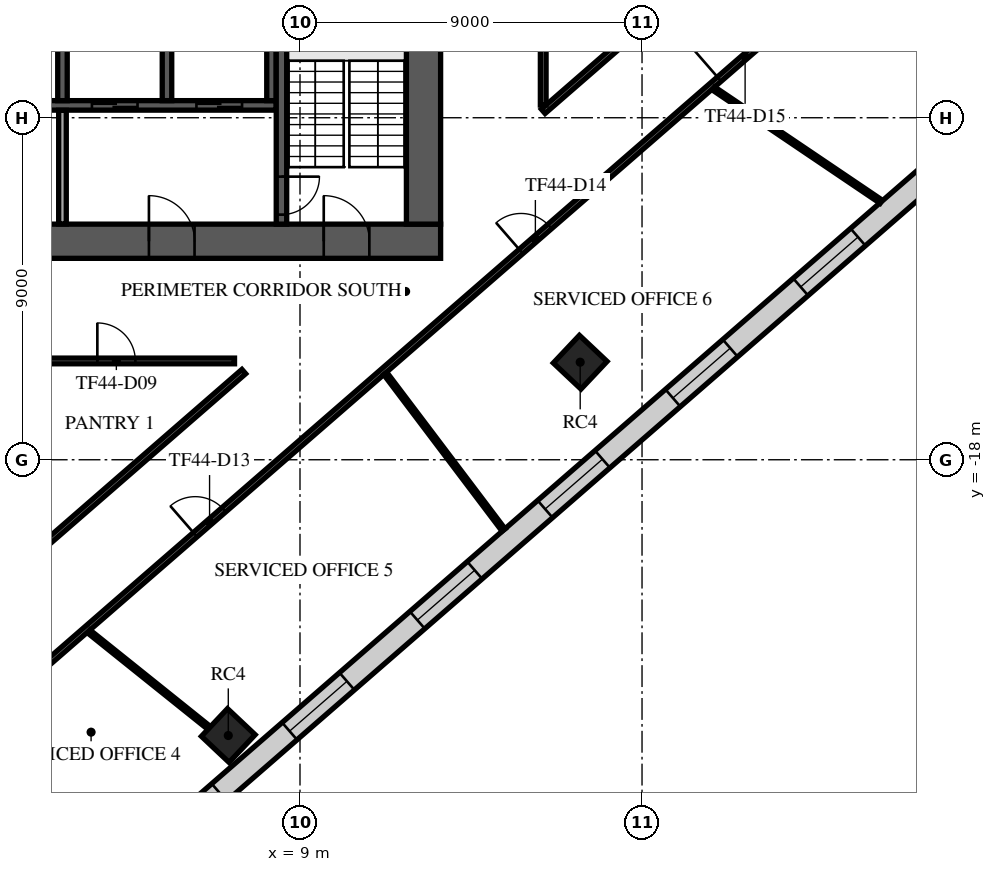
"""IFC4 building model, lengths in metres.
Left out: names, types, materials, properties, quantities, classifications, styles, units other than length and angle.
Written with IfcOpenShell. Run it as: python <this file> out.ifc"""

import sys

from ifc_helpers import new_model, si_unit, direction, frame, frame_2d, origin, origin_2d, place, context, subcontext, project, spatial, rectangle, extrude, element, fill, save


model = new_model("IFC4")
c1 = context("Model", 3, precision=1e-05, world=origin(), true_north=direction((0.0, 1.0)))
c2 = subcontext(c1, "Body", "Model", "MODEL_VIEW")
j1 = project(units=[si_unit("LENGTHUNIT", "METRE"), si_unit("PLANEANGLEUNIT", "RADIAN")], contexts=[c1])
p1 = place(None, origin())
s1 = spatial("IfcSite", under=j1, at=p1, CompositionType="ELEMENT")
p2 = place(p1, origin())
s2 = spatial("IfcBuilding", under=s1, at=p2, CompositionType="ELEMENT")
p3 = place(p2, frame((0.0, 0.0, 193.3)))
s3 = spatial("IfcBuildingStorey", under=s2, at=p3, CompositionType="ELEMENT", Elevation=193.3)
for number, where, z_axis, x_axis in (
    (1, (7.113, -25.257, 0.0), (0.0, 0.0, 1.0), (0.686, 0.728, 0.0)),
    (2, (16.373, -15.433, 0.0), (0.0, 0.0, 1.0), (0.686, 0.728, 0.0)),
):
    element("IfcColumn", number, at=place(p3, frame(where, z_axis=z_axis, x_axis=x_axis)), inside=s3, PredefinedType="COLUMN", context=c2, shape_type="SweptSolid", body=[
        extrude(rectangle(XDim=1.0, YDim=1.0, at=origin_2d()), origin(), (0.0, 0.0, 1.0), 4.0),
    ])
p4 = place(p3, frame((-12.7, -12.25, 0.0), z_axis=(0.0, 0.0, 1.0), x_axis=(1.0, 0.0, 0.0)))
e3 = element("IfcWall", 3, at=p4, inside=s3, PredefinedType="SHEAR", context=c2, shape_type="SweptSolid", body=[
    extrude(rectangle(XDim=25.4, YDim=0.9, at=frame_2d((12.7, 0.0))), origin(), (0.0, 0.0, 1.0), 3.62),
])
p5 = place(p4, frame((7.6, 0.0, 0.0)))
e4 = element("IfcOpeningElement", 4, at=p5, cuts=e3, PredefinedType="OPENING", context=c2, shape_type="SweptSolid", body=[
    extrude(rectangle(XDim=2.0, YDim=2.1, at=frame_2d((1.0, 1.05))), frame((0.0, 0.46, 0.0), z_axis=(0.0, -1.0, 0.0), x_axis=(1.0, 0.0, 0.0)), (0.0, 0.0, 1.0), 0.92),
])
p6 = place(p4, frame((17.725, 0.0, 0.0)))
e5 = element("IfcOpeningElement", 5, at=p6, cuts=e3, PredefinedType="OPENING", context=c2, shape_type="SweptSolid", body=[
    extrude(rectangle(XDim=1.2, YDim=2.1, at=frame_2d((0.6, 1.05))), frame((0.0, 0.46, 0.0), z_axis=(0.0, -1.0, 0.0), x_axis=(1.0, 0.0, 0.0)), (0.0, 0.0, 1.0), 0.92),
])
p7 = place(p4, frame((1.875, 0.0, 0.0)))
e6 = element("IfcOpeningElement", 6, at=p7, cuts=e3, PredefinedType="OPENING", context=c2, shape_type="SweptSolid", body=[
    extrude(rectangle(XDim=1.2, YDim=2.1, at=frame_2d((0.6, 1.05))), frame((0.0, 0.46, 0.0), z_axis=(0.0, -1.0, 0.0), x_axis=(1.0, 0.0, 0.0)), (0.0, 0.0, 1.0), 0.92),
])
p8 = place(p4, frame((22.325, 0.0, 0.0)))
e7 = element("IfcOpeningElement", 7, at=p8, cuts=e3, PredefinedType="OPENING", context=c2, shape_type="SweptSolid", body=[
    extrude(rectangle(XDim=1.2, YDim=2.1, at=frame_2d((0.6, 1.05))), frame((0.0, 0.46, 0.0), z_axis=(0.0, -1.0, 0.0), x_axis=(1.0, 0.0, 0.0)), (0.0, 0.0, 1.0), 0.92),
])
p9 = place(p3, frame((12.25, -11.8, 0.0), z_axis=(0.0, 0.0, 1.0), x_axis=(0.0, 1.0, 0.0)))
e8 = element("IfcWall", 8, at=p9, inside=s3, PredefinedType="SHEAR", context=c2, shape_type="SweptSolid", body=[
    extrude(rectangle(XDim=23.6, YDim=0.9, at=frame_2d((11.8, 0.0))), origin(), (0.0, 0.0, 1.0), 3.62),
])
p10 = place(p9, frame((10.6, 0.0, 0.0)))
e9 = element("IfcOpeningElement", 9, at=p10, cuts=e8, PredefinedType="OPENING", context=c2, shape_type="SweptSolid", body=[
    extrude(rectangle(XDim=2.4, YDim=2.4, at=frame_2d((1.2, 1.2))), frame((0.0, 0.46, 0.0), z_axis=(0.0, -1.0, 0.0), x_axis=(1.0, 0.0, 0.0)), (0.0, 0.0, 1.0), 0.92),
])
p11 = place(p3, frame((-2.875, -8.675, 0.0), z_axis=(0.0, 0.0, 1.0), x_axis=(1.0, 0.0, 0.0)))
e10 = element("IfcWall", 10, at=p11, inside=s3, PredefinedType="SOLIDWALL", context=c2, shape_type="SweptSolid", body=[
    extrude(rectangle(XDim=11.25, YDim=0.25, at=frame_2d((5.625, 0.0))), origin(), (0.0, 0.0, 1.0), 3.62),
])
p12 = place(p11, frame((0.9, 0.0, 0.0)))
e11 = element("IfcOpeningElement", 11, at=p12, cuts=e10, PredefinedType="OPENING", context=c2, shape_type="SweptSolid", body=[
    extrude(rectangle(XDim=1.2, YDim=2.1, at=frame_2d((0.6, 1.05))), frame((0.0, 0.135, 0.0), z_axis=(0.0, -1.0, 0.0), x_axis=(1.0, 0.0, 0.0)), (0.0, 0.0, 1.0), 0.27),
])
p13 = place(p11, frame((3.65, 0.0, 0.0)))
e12 = element("IfcOpeningElement", 12, at=p13, cuts=e10, PredefinedType="OPENING", context=c2, shape_type="SweptSolid", body=[
    extrude(rectangle(XDim=1.2, YDim=2.1, at=frame_2d((0.6, 1.05))), frame((0.0, 0.135, 0.0), z_axis=(0.0, -1.0, 0.0), x_axis=(1.0, 0.0, 0.0)), (0.0, 0.0, 1.0), 0.27),
])
p14 = place(p11, frame((6.4, 0.0, 0.0)))
e13 = element("IfcOpeningElement", 13, at=p14, cuts=e10, PredefinedType="OPENING", context=c2, shape_type="SweptSolid", body=[
    extrude(rectangle(XDim=1.2, YDim=2.1, at=frame_2d((0.6, 1.05))), frame((0.0, 0.135, 0.0), z_axis=(0.0, -1.0, 0.0), x_axis=(1.0, 0.0, 0.0)), (0.0, 0.0, 1.0), 0.27),
])
p15 = place(p11, frame((9.15, 0.0, 0.0)))
e14 = element("IfcOpeningElement", 14, at=p15, cuts=e10, PredefinedType="OPENING", context=c2, shape_type="SweptSolid", body=[
    extrude(rectangle(XDim=1.2, YDim=2.1, at=frame_2d((0.6, 1.05))), frame((0.0, 0.135, 0.0), z_axis=(0.0, -1.0, 0.0), x_axis=(1.0, 0.0, 0.0)), (0.0, 0.0, 1.0), 0.27),
])
for number, where, z_axis, x_axis in (
    (15, (2.75, -8.55, 0.0), (0.0, 0.0, 1.0), (0.0, 1.0, 0.0)),
    (16, (5.5, -8.55, 0.0), (0.0, 0.0, 1.0), (0.0, 1.0, 0.0)),
    (17, (8.25, -8.55, 0.0), (0.0, 0.0, 1.0), (0.0, 1.0, 0.0)),
):
    element("IfcWall", number, at=place(p3, frame(where, z_axis=z_axis, x_axis=x_axis)), inside=s3, PredefinedType="SOLIDWALL", context=c2, shape_type="SweptSolid", body=[
        extrude(rectangle(XDim=2.7, YDim=0.25, at=frame_2d((1.35, 0.0))), origin(), (0.0, 0.0, 1.0), 3.62),
    ])
p16 = place(p3, frame((8.512, -4.55, 0.0), z_axis=(0.0, 0.0, 1.0), x_axis=(0.0, -1.0, 0.0)))
e18 = element("IfcWall", 18, at=p16, inside=s3, PredefinedType="SOLIDWALL", context=c2, shape_type="SweptSolid", body=[
    extrude(rectangle(XDim=7.25, YDim=0.275, at=frame_2d((3.625, 0.0))), origin(), (0.0, 0.0, 1.0), 3.62),
])
p17 = place(p16, frame((6.0, 0.0, 0.0)))
e19 = element("IfcOpeningElement", 19, at=p17, cuts=e18, PredefinedType="OPENING", context=c2, shape_type="SweptSolid", body=[
    extrude(rectangle(XDim=1.0, YDim=2.1, at=frame_2d((0.5, 1.05))), frame((0.0, 0.147, 0.0), z_axis=(0.0, -1.0, 0.0), x_axis=(1.0, 0.0, 0.0)), (0.0, 0.0, 1.0), 0.295),
])
p18 = place(p3, frame((2.75, -11.795, 0.0), z_axis=(0.0, 0.0, 1.0), x_axis=(0.0, 1.0, 0.0)))
e20 = element("IfcWall", 20, at=p18, inside=s3, PredefinedType="PARTITIONING", context=c2, shape_type="SweptSolid", body=[
    extrude(rectangle(XDim=2.99, YDim=0.2, at=frame_2d((1.495, 0.0))), origin(), (0.0, 0.0, 1.0), 3.62),
])
p19 = place(p3, frame((-2.286, -34.715, 0.0), z_axis=(0.0, 0.0, 1.0), x_axis=(0.754708272811, 0.656060532993, 0.0)))
e21 = element("IfcWall", 21, at=p19, inside=s3, PredefinedType="STANDARD", context=c2, shape_type="SweptSolid", body=[
    extrude(rectangle(XDim=49.0, YDim=0.6, at=frame_2d((24.5, 0.0))), origin(), (0.0, 0.0, 1.0), 3.62),
])
p20 = place(p19, frame((1.227, 0.0, 0.9)))
e22 = element("IfcOpeningElement", 22, at=p20, cuts=e21, PredefinedType="OPENING", context=c2, shape_type="SweptSolid", body=[
    extrude(rectangle(XDim=2.0, YDim=2.1, at=frame_2d((1.0, 1.05))), frame((0.0, 0.31, 0.0), z_axis=(0.0, -1.0, 0.0), x_axis=(1.0, 0.0, 0.0)), (0.0, 0.0, 1.0), 0.62),
])
p21 = place(p19, frame((5.682, 0.0, 0.9)))
e23 = element("IfcOpeningElement", 23, at=p21, cuts=e21, PredefinedType="OPENING", context=c2, shape_type="SweptSolid", body=[
    extrude(rectangle(XDim=2.0, YDim=2.1, at=frame_2d((1.0, 1.05))), frame((0.0, 0.31, 0.0), z_axis=(0.0, -1.0, 0.0), x_axis=(1.0, 0.0, 0.0)), (0.0, 0.0, 1.0), 0.62),
])
p22 = place(p19, frame((10.136, 0.0, 0.9)))
e24 = element("IfcOpeningElement", 24, at=p22, cuts=e21, PredefinedType="OPENING", context=c2, shape_type="SweptSolid", body=[
    extrude(rectangle(XDim=2.0, YDim=2.1, at=frame_2d((1.0, 1.05))), frame((0.0, 0.31, 0.0), z_axis=(0.0, -1.0, 0.0), x_axis=(1.0, 0.0, 0.0)), (0.0, 0.0, 1.0), 0.62),
])
p23 = place(p19, frame((14.591, 0.0, 0.9)))
e25 = element("IfcOpeningElement", 25, at=p23, cuts=e21, PredefinedType="OPENING", context=c2, shape_type="SweptSolid", body=[
    extrude(rectangle(XDim=2.0, YDim=2.1, at=frame_2d((1.0, 1.05))), frame((0.0, 0.31, 0.0), z_axis=(0.0, -1.0, 0.0), x_axis=(1.0, 0.0, 0.0)), (0.0, 0.0, 1.0), 0.62),
])
p24 = place(p19, frame((19.045, 0.0, 0.9)))
e26 = element("IfcOpeningElement", 26, at=p24, cuts=e21, PredefinedType="OPENING", context=c2, shape_type="SweptSolid", body=[
    extrude(rectangle(XDim=2.0, YDim=2.1, at=frame_2d((1.0, 1.05))), frame((0.0, 0.31, 0.0), z_axis=(0.0, -1.0, 0.0), x_axis=(1.0, 0.0, 0.0)), (0.0, 0.0, 1.0), 0.62),
])
p25 = place(p19, frame((23.5, 0.0, 0.9)))
e27 = element("IfcOpeningElement", 27, at=p25, cuts=e21, PredefinedType="OPENING", context=c2, shape_type="SweptSolid", body=[
    extrude(rectangle(XDim=2.0, YDim=2.1, at=frame_2d((1.0, 1.05))), frame((0.0, 0.31, 0.0), z_axis=(0.0, -1.0, 0.0), x_axis=(1.0, 0.0, 0.0)), (0.0, 0.0, 1.0), 0.62),
])
p26 = place(p19, frame((27.955, 0.0, 0.9)))
e28 = element("IfcOpeningElement", 28, at=p26, cuts=e21, PredefinedType="OPENING", context=c2, shape_type="SweptSolid", body=[
    extrude(rectangle(XDim=2.0, YDim=2.1, at=frame_2d((1.0, 1.05))), frame((0.0, 0.31, 0.0), z_axis=(0.0, -1.0, 0.0), x_axis=(1.0, 0.0, 0.0)), (0.0, 0.0, 1.0), 0.62),
])
p27 = place(p19, frame((32.409, 0.0, 0.9)))
e29 = element("IfcOpeningElement", 29, at=p27, cuts=e21, PredefinedType="OPENING", context=c2, shape_type="SweptSolid", body=[
    extrude(rectangle(XDim=2.0, YDim=2.1, at=frame_2d((1.0, 1.05))), frame((0.0, 0.31, 0.0), z_axis=(0.0, -1.0, 0.0), x_axis=(1.0, 0.0, 0.0)), (0.0, 0.0, 1.0), 0.62),
])
p28 = place(p19, frame((36.864, 0.0, 0.9)))
e30 = element("IfcOpeningElement", 30, at=p28, cuts=e21, PredefinedType="OPENING", context=c2, shape_type="SweptSolid", body=[
    extrude(rectangle(XDim=2.0, YDim=2.1, at=frame_2d((1.0, 1.05))), frame((0.0, 0.31, 0.0), z_axis=(0.0, -1.0, 0.0), x_axis=(1.0, 0.0, 0.0)), (0.0, 0.0, 1.0), 0.62),
])
p29 = place(p19, frame((41.318, 0.0, 0.9)))
e31 = element("IfcOpeningElement", 31, at=p29, cuts=e21, PredefinedType="OPENING", context=c2, shape_type="SweptSolid", body=[
    extrude(rectangle(XDim=2.0, YDim=2.1, at=frame_2d((1.0, 1.05))), frame((0.0, 0.31, 0.0), z_axis=(0.0, -1.0, 0.0), x_axis=(1.0, 0.0, 0.0)), (0.0, 0.0, 1.0), 0.62),
])
p30 = place(p19, frame((45.773, 0.0, 0.9)))
e32 = element("IfcOpeningElement", 32, at=p30, cuts=e21, PredefinedType="OPENING", context=c2, shape_type="SweptSolid", body=[
    extrude(rectangle(XDim=2.0, YDim=2.1, at=frame_2d((1.0, 1.05))), frame((0.0, 0.31, 0.0), z_axis=(0.0, -1.0, 0.0), x_axis=(1.0, 0.0, 0.0)), (0.0, 0.0, 1.0), 0.62),
])
p31 = place(p3, frame((-10.486, -15.4, 0.0), z_axis=(0.0, 0.0, 1.0), x_axis=(1.0, 0.0, 0.0)))
e33 = element("IfcWall", 33, at=p31, inside=s3, PredefinedType="PARTITIONING", context=c2, shape_type="SweptSolid", body=[
    extrude(rectangle(XDim=17.763, YDim=0.15, at=frame_2d((8.882, 0.0))), origin(), (0.0, 0.0, 1.0), 3.17),
])
p32 = place(p31, frame((14.154, 0.0, 0.0)))
e34 = element("IfcOpeningElement", 34, at=p32, cuts=e33, PredefinedType="OPENING", context=c2, shape_type="SweptSolid", body=[
    extrude(rectangle(XDim=1.0, YDim=2.1, at=frame_2d((0.5, 1.05))), frame((0.0, 0.085, 0.0), z_axis=(0.0, -1.0, 0.0), x_axis=(1.0, 0.0, 0.0)), (0.0, 0.0, 1.0), 0.17),
])
p33 = place(p3, frame((-2.631, -24.505, 0.0), z_axis=(0.0, 0.0, 1.0), x_axis=(0.754714526528, 0.656053338874, 0.0)))
e35 = element("IfcWall", 35, at=p33, inside=s3, PredefinedType="PARTITIONING", context=c2, shape_type="SweptSolid", body=[
    extrude(rectangle(XDim=13.452, YDim=0.15, at=frame_2d((6.726, 0.0))), origin(), (0.0, 0.0, 1.0), 3.17),
])
p34 = place(p33, frame((3.05, 0.0, 0.0)))
e36 = element("IfcOpeningElement", 36, at=p34, cuts=e35, PredefinedType="OPENING", context=c2, shape_type="SweptSolid", body=[
    extrude(rectangle(XDim=1.0, YDim=2.1, at=frame_2d((0.5, 1.05))), frame((0.0, 0.085, 0.0), z_axis=(0.0, -1.0, 0.0), x_axis=(1.0, 0.0, 0.0)), (0.0, 0.0, 1.0), 0.17),
])
p35 = place(p3, frame((-1.0, -26.268, 0.0), z_axis=(0.0, 0.0, 1.0), x_axis=(0.754711356604, 0.656056985492, 0.0)))
e37 = element("IfcWall", 37, at=p35, inside=s3, PredefinedType="PARTITIONING", context=c2, shape_type="SweptSolid", body=[
    extrude(rectangle(XDim=36.052, YDim=0.15, at=frame_2d((18.026, 0.0))), origin(), (0.0, 0.0, 1.0), 3.17),
])
p36 = place(p35, frame((9.598, 0.0, 0.0)))
e38 = element("IfcOpeningElement", 38, at=p36, cuts=e37, PredefinedType="OPENING", context=c2, shape_type="SweptSolid", body=[
    extrude(rectangle(XDim=1.0, YDim=2.1, at=frame_2d((0.5, 1.05))), frame((0.0, 0.085, 0.0), z_axis=(0.0, -1.0, 0.0), x_axis=(1.0, 0.0, 0.0)), (0.0, 0.0, 1.0), 0.17),
])
p37 = place(p35, frame((20.957, 0.0, 0.0)))
e39 = element("IfcOpeningElement", 39, at=p37, cuts=e37, PredefinedType="OPENING", context=c2, shape_type="SweptSolid", body=[
    extrude(rectangle(XDim=1.0, YDim=2.1, at=frame_2d((0.5, 1.05))), frame((0.0, 0.085, 0.0), z_axis=(0.0, -1.0, 0.0), x_axis=(1.0, 0.0, 0.0)), (0.0, 0.0, 1.0), 0.17),
])
p38 = place(p35, frame((27.87, 0.0, 0.0)))
e40 = element("IfcOpeningElement", 40, at=p38, cuts=e37, PredefinedType="OPENING", context=c2, shape_type="SweptSolid", body=[
    extrude(rectangle(XDim=1.8, YDim=2.1, at=frame_2d((0.9, 1.05))), frame((0.0, 0.085, 0.0), z_axis=(0.0, -1.0, 0.0), x_axis=(1.0, 0.0, 0.0)), (0.0, 0.0, 1.0), 0.17),
])
p39 = place(p3, frame((15.4, -8.831, 0.0), z_axis=(0.0, 0.0, 1.0), x_axis=(0.754715065445, 0.656052718911, 0.0)))
e41 = element("IfcWall", 41, at=p39, inside=s3, PredefinedType="PARTITIONING", context=c2, shape_type="SweptSolid", body=[
    extrude(rectangle(XDim=12.234, YDim=0.15, at=frame_2d((6.117, 0.0))), origin(), (0.0, 0.0, 1.0), 3.17),
])
p40 = place(p39, frame((8.8, 0.0, 0.0)))
e42 = element("IfcOpeningElement", 42, at=p40, cuts=e41, PredefinedType="OPENING", context=c2, shape_type="SweptSolid", body=[
    extrude(rectangle(XDim=1.0, YDim=2.1, at=frame_2d((0.5, 1.05))), frame((0.0, 0.085, 0.0), z_axis=(0.0, -1.0, 0.0), x_axis=(1.0, 0.0, 0.0)), (0.0, 0.0, 1.0), 0.17),
])
p41 = place(p3, frame((15.4, -8.667, 0.0), z_axis=(0.0, 0.0, 1.0), x_axis=(0.0, 1.0, 0.0)))
e43 = element("IfcWall", 43, at=p41, inside=s3, PredefinedType="PARTITIONING", context=c2, shape_type="SweptSolid", body=[
    extrude(rectangle(XDim=15.944, YDim=0.15, at=frame_2d((7.972, 0.0))), origin(), (0.0, 0.0, 1.0), 3.17),
])
p42 = place(p3, frame((3.441, -22.517, 0.0), z_axis=(0.0, 0.0, 1.0), x_axis=(0.780129784841, -0.62561770979, 0.0)))
e44 = element("IfcWall", 44, at=p42, inside=s3, PredefinedType="PARTITIONING", context=c2, shape_type="SweptSolid", body=[
    extrude(rectangle(XDim=4.064, YDim=0.1, at=frame_2d((2.032, 0.0))), origin(), (0.0, 0.0, 1.0), 3.17),
])
p43 = place(p3, frame((11.243, -15.729, 0.0), z_axis=(0.0, 0.0, 1.0), x_axis=(0.602848474471, -0.797855699251, 0.0)))
e45 = element("IfcWall", 45, at=p43, inside=s3, PredefinedType="PARTITIONING", context=c2, shape_type="SweptSolid", body=[
    extrude(rectangle(XDim=5.163, YDim=0.1, at=frame_2d((2.582, 0.0))), origin(), (0.0, 0.0, 1.0), 3.17),
])
p44 = place(p3, frame((19.882, -8.231, 0.0), z_axis=(0.0, 0.0, 1.0), x_axis=(0.828654525471, -0.559760374997, 0.0)))
e46 = element("IfcWall", 46, at=p44, inside=s3, PredefinedType="PARTITIONING", context=c2, shape_type="SweptSolid", body=[
    extrude(rectangle(XDim=5.322, YDim=0.1, at=frame_2d((2.661, 0.0))), origin(), (0.0, 0.0, 1.0), 3.62),
])
p45 = place(p6, origin())
e47 = element("IfcDoor", 47, at=p45, inside=s3, OperationType="SINGLE_SWING_LEFT", PredefinedType="DOOR", context=c2, shape_type="SweptSolid", body=[
    extrude(rectangle(XDim=1.2, YDim=2.1, at=frame_2d((0.6, 1.05))), frame((0.0, 0.025, 0.0), z_axis=(0.0, -1.0, 0.0), x_axis=(1.0, 0.0, 0.0)), (0.0, 0.0, 1.0), 0.05),
])
fill(e5, e47)
p46 = place(p8, origin())
e48 = element("IfcDoor", 48, at=p46, inside=s3, OperationType="SINGLE_SWING_LEFT", PredefinedType="DOOR", context=c2, shape_type="SweptSolid", body=[
    extrude(rectangle(XDim=1.2, YDim=2.1, at=frame_2d((0.6, 1.05))), frame((0.0, 0.025, 0.0), z_axis=(0.0, -1.0, 0.0), x_axis=(1.0, 0.0, 0.0)), (0.0, 0.0, 1.0), 0.05),
])
fill(e7, e48)
p47 = place(p14, origin())
e49 = element("IfcDoor", 49, at=p47, inside=s3, OperationType="DOUBLE_DOOR_SLIDING", PredefinedType="DOOR", context=c2, shape_type="SweptSolid", body=[
    extrude(rectangle(XDim=1.2, YDim=2.1, at=frame_2d((0.6, 1.05))), frame((0.0, 0.025, 0.0), z_axis=(0.0, -1.0, 0.0), x_axis=(1.0, 0.0, 0.0)), (0.0, 0.0, 1.0), 0.05),
])
fill(e13, e49)
p48 = place(p15, origin())
e50 = element("IfcDoor", 50, at=p48, inside=s3, OperationType="DOUBLE_DOOR_SLIDING", PredefinedType="DOOR", context=c2, shape_type="SweptSolid", body=[
    extrude(rectangle(XDim=1.2, YDim=2.1, at=frame_2d((0.6, 1.05))), frame((0.0, 0.025, 0.0), z_axis=(0.0, -1.0, 0.0), x_axis=(1.0, 0.0, 0.0)), (0.0, 0.0, 1.0), 0.05),
])
fill(e14, e50)
p49 = place(p17, origin())
e51 = element("IfcDoor", 51, at=p49, inside=s3, OperationType="SINGLE_SWING_LEFT", PredefinedType="DOOR", context=c2, shape_type="SweptSolid", body=[
    extrude(rectangle(XDim=1.0, YDim=2.1, at=frame_2d((0.5, 1.05))), frame((0.0, 0.025, 0.0), z_axis=(0.0, -1.0, 0.0), x_axis=(1.0, 0.0, 0.0)), (0.0, 0.0, 1.0), 0.05),
])
fill(e19, e51)
p50 = place(p22, origin())
e52 = element("IfcWindow", 52, at=p50, inside=s3, PartitioningType="SINGLE_PANEL", PredefinedType="WINDOW", context=c2, shape_type="SweptSolid", body=[
    extrude(rectangle(XDim=2.0, YDim=2.1, at=frame_2d((1.0, 1.05))), frame((0.0, 0.03, 0.0), z_axis=(0.0, -1.0, 0.0), x_axis=(1.0, 0.0, 0.0)), (0.0, 0.0, 1.0), 0.06),
])
fill(e24, e52)
p51 = place(p23, origin())
e53 = element("IfcWindow", 53, at=p51, inside=s3, PartitioningType="SINGLE_PANEL", PredefinedType="WINDOW", context=c2, shape_type="SweptSolid", body=[
    extrude(rectangle(XDim=2.0, YDim=2.1, at=frame_2d((1.0, 1.05))), frame((0.0, 0.03, 0.0), z_axis=(0.0, -1.0, 0.0), x_axis=(1.0, 0.0, 0.0)), (0.0, 0.0, 1.0), 0.06),
])
fill(e25, e53)
p52 = place(p24, origin())
e54 = element("IfcWindow", 54, at=p52, inside=s3, PartitioningType="SINGLE_PANEL", PredefinedType="WINDOW", context=c2, shape_type="SweptSolid", body=[
    extrude(rectangle(XDim=2.0, YDim=2.1, at=frame_2d((1.0, 1.05))), frame((0.0, 0.03, 0.0), z_axis=(0.0, -1.0, 0.0), x_axis=(1.0, 0.0, 0.0)), (0.0, 0.0, 1.0), 0.06),
])
fill(e26, e54)
p53 = place(p25, origin())
e55 = element("IfcWindow", 55, at=p53, inside=s3, PartitioningType="SINGLE_PANEL", PredefinedType="WINDOW", context=c2, shape_type="SweptSolid", body=[
    extrude(rectangle(XDim=2.0, YDim=2.1, at=frame_2d((1.0, 1.05))), frame((0.0, 0.03, 0.0), z_axis=(0.0, -1.0, 0.0), x_axis=(1.0, 0.0, 0.0)), (0.0, 0.0, 1.0), 0.06),
])
fill(e27, e55)
p54 = place(p26, origin())
e56 = element("IfcWindow", 56, at=p54, inside=s3, PartitioningType="SINGLE_PANEL", PredefinedType="WINDOW", context=c2, shape_type="SweptSolid", body=[
    extrude(rectangle(XDim=2.0, YDim=2.1, at=frame_2d((1.0, 1.05))), frame((0.0, 0.03, 0.0), z_axis=(0.0, -1.0, 0.0), x_axis=(1.0, 0.0, 0.0)), (0.0, 0.0, 1.0), 0.06),
])
fill(e28, e56)
p55 = place(p27, origin())
e57 = element("IfcWindow", 57, at=p55, inside=s3, PartitioningType="SINGLE_PANEL", PredefinedType="WINDOW", context=c2, shape_type="SweptSolid", body=[
    extrude(rectangle(XDim=2.0, YDim=2.1, at=frame_2d((1.0, 1.05))), frame((0.0, 0.03, 0.0), z_axis=(0.0, -1.0, 0.0), x_axis=(1.0, 0.0, 0.0)), (0.0, 0.0, 1.0), 0.06),
])
fill(e29, e57)
p56 = place(p32, frame((1.0, 0.0, 0.0), z_axis=(0.0, 0.0, 1.0), x_axis=(-1.0, 0.0, 0.0)))
e58 = element("IfcDoor", 58, at=p56, inside=s3, OperationType="SINGLE_SWING_LEFT", PredefinedType="DOOR", context=c2, shape_type="SweptSolid", body=[
    extrude(rectangle(XDim=1.0, YDim=2.1, at=frame_2d((0.5, 1.05))), frame((0.0, 0.025, 0.0), z_axis=(0.0, -1.0, 0.0), x_axis=(1.0, 0.0, 0.0)), (0.0, 0.0, 1.0), 0.05),
])
fill(e34, e58)
p57 = place(p36, frame((1.0, 0.0, 0.0), z_axis=(0.0, 0.0, 1.0), x_axis=(-1.0, 0.0, 0.0)))
e59 = element("IfcDoor", 59, at=p57, inside=s3, OperationType="SINGLE_SWING_LEFT", PredefinedType="DOOR", context=c2, shape_type="SweptSolid", body=[
    extrude(rectangle(XDim=1.0, YDim=2.1, at=frame_2d((0.5, 1.05))), frame((0.0, 0.025, 0.0), z_axis=(0.0, -1.0, 0.0), x_axis=(1.0, 0.0, 0.0)), (0.0, 0.0, 1.0), 0.05),
])
fill(e38, e59)
p58 = place(p37, frame((1.0, 0.0, 0.0), z_axis=(0.0, 0.0, 1.0), x_axis=(-1.0, 0.0, 0.0)))
e60 = element("IfcDoor", 60, at=p58, inside=s3, OperationType="SINGLE_SWING_LEFT", PredefinedType="DOOR", context=c2, shape_type="SweptSolid", body=[
    extrude(rectangle(XDim=1.0, YDim=2.1, at=frame_2d((0.5, 1.05))), frame((0.0, 0.025, 0.0), z_axis=(0.0, -1.0, 0.0), x_axis=(1.0, 0.0, 0.0)), (0.0, 0.0, 1.0), 0.05),
])
fill(e39, e60)
p59 = place(p38, frame((1.8, 0.0, 0.0), z_axis=(0.0, 0.0, 1.0), x_axis=(-1.0, 0.0, 0.0)))
e61 = element("IfcDoor", 61, at=p59, inside=s3, OperationType="DOUBLE_DOOR_SINGLE_SWING", PredefinedType="DOOR", context=c2, shape_type="SweptSolid", body=[
    extrude(rectangle(XDim=1.8, YDim=2.1, at=frame_2d((0.9, 1.05))), frame((0.0, 0.025, 0.0), z_axis=(0.0, -1.0, 0.0), x_axis=(1.0, 0.0, 0.0)), (0.0, 0.0, 1.0), 0.05),
])
fill(e40, e61)
save(model, sys.argv[1])
